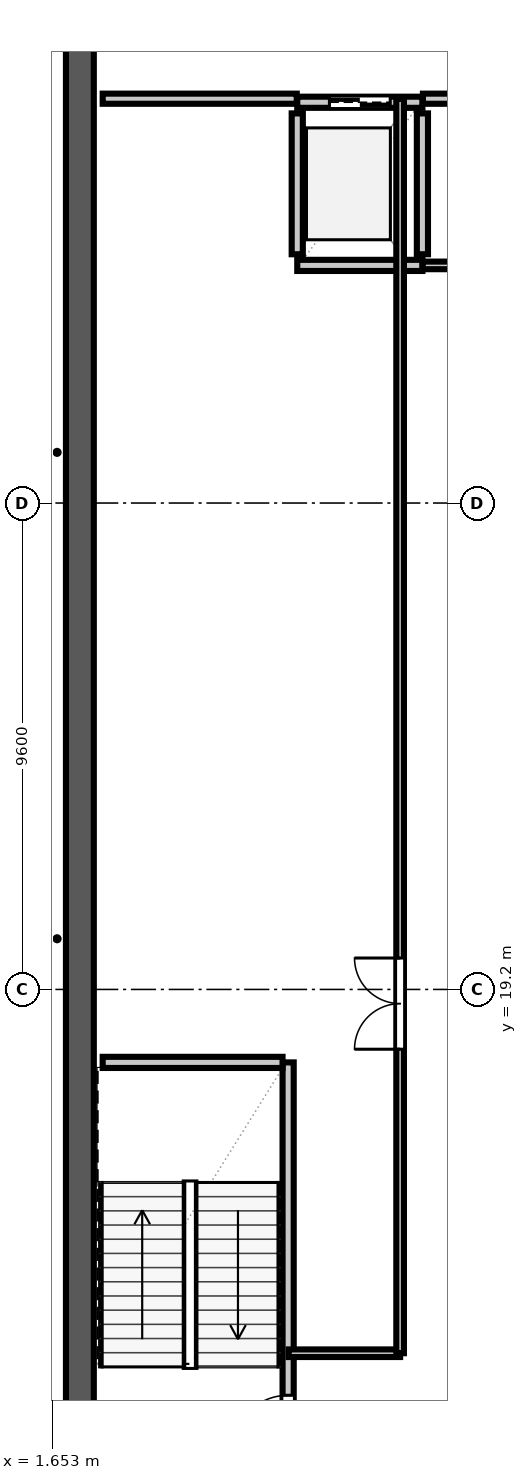
"""IFC4 building model, lengths in metres.
Left out: names, types, materials, properties, quantities, classifications, styles, units other than length and angle.
Written with IfcOpenShell. Run it as: python <this file> out.ifc"""

import sys

from ifc_helpers import new_model, si_unit, direction, frame, frame_2d, origin, place, context, subcontext, project, spatial, rectangle, extrude, element, fill, save


model = new_model("IFC4")
c1 = context("Model", 3, precision=1e-05, world=origin(), true_north=direction((0.0, 1.0)))
c2 = subcontext(c1, "Body", "Model", "MODEL_VIEW")
j1 = project(units=[si_unit("LENGTHUNIT", "METRE"), si_unit("PLANEANGLEUNIT", "RADIAN")], contexts=[c1])
p1 = place(None, origin())
s1 = spatial("IfcSite", under=j1, at=p1, CompositionType="ELEMENT")
p2 = place(p1, origin())
s2 = spatial("IfcBuilding", under=s1, at=p2, CompositionType="ELEMENT")
p3 = place(p2, frame((0.0, 0.0, 256.0)))
s3 = spatial("IfcBuildingStorey", under=s2, at=p3, CompositionType="ELEMENT", Elevation=256.0)
p4 = place(p3, frame((2.2, 9.325, 0.0), z_axis=(0.0, 0.0, 1.0), x_axis=(0.0, 1.0, 0.0)))
e1 = element("IfcWall", 1, at=p4, inside=s3, PredefinedType="SHEAR", context=c2, shape_type="SweptSolid", body=[
    extrude(rectangle(XDim=38.95, YDim=0.55, at=frame_2d((19.475, 0.0))), origin(), (0.0, 0.0, 1.0), 4.74),
])
p5 = place(p3, frame((6.31, 9.95, 0.0), z_axis=(0.0, 0.0, 1.0), x_axis=(0.0, 1.0, 0.0)))
e2 = element("IfcWall", 2, at=p5, inside=s3, PredefinedType="SOLIDWALL", context=c2, shape_type="SweptSolid", body=[
    extrude(rectangle(XDim=7.81, YDim=0.22, at=frame_2d((3.905, 0.0))), origin(), (0.0, 0.0, 1.0), 4.74),
])
p6 = place(p5, frame((0.14, 0.0, 0.0)))
e3 = element("IfcOpeningElement", 3, at=p6, cuts=e2, PredefinedType="OPENING", context=c2, shape_type="SweptSolid", body=[
    extrude(rectangle(XDim=1.1, YDim=2.2, at=frame_2d((0.55, 1.1))), frame((0.0, 0.122, 0.0), z_axis=(0.0, -1.0, 0.0), x_axis=(1.0, 0.0, 0.0)), (0.0, 0.0, 1.0), 0.244),
])
p7 = place(p3, frame((2.65, 17.76, 0.0), z_axis=(0.0, 0.0, 1.0), x_axis=(1.0, 0.0, 0.0)))
e4 = element("IfcWall", 4, at=p7, inside=s3, PredefinedType="SOLIDWALL", context=c2, shape_type="SweptSolid", body=[
    extrude(rectangle(XDim=3.55, YDim=0.22, at=frame_2d((1.775, 0.0))), origin(), (0.0, 0.0, 1.0), 4.74),
])
for number, where, z_axis, x_axis in (
    (5, (6.49, 33.71, 0.0), (0.0, 0.0, 1.0), (0.0, 1.0, 0.0)),
    (6, (8.96, 33.71, 0.0), (0.0, 0.0, 1.0), (0.0, 1.0, 0.0)),
):
    element("IfcWall", number, at=place(p3, frame(where, z_axis=z_axis, x_axis=x_axis)), inside=s3, PredefinedType="SOLIDWALL", context=c2, shape_type="SweptSolid", body=[
        extrude(rectangle(XDim=2.78, YDim=0.22, at=frame_2d((1.39, 0.0))), origin(), (0.0, 0.0, 1.0), 4.74),
    ])
p8 = place(p3, frame((6.49, 33.49, 0.0), z_axis=(0.0, 0.0, 1.0), x_axis=(1.0, 0.0, 0.0)))
e7 = element("IfcWall", 7, at=p8, inside=s3, PredefinedType="SOLIDWALL", context=c2, shape_type="SweptSolid", body=[
    extrude(rectangle(XDim=2.47, YDim=0.22, at=frame_2d((1.235, 0.0))), origin(), (0.0, 0.0, 1.0), 4.74),
])
p9 = place(p3, frame((6.49, 36.71, 0.0), z_axis=(0.0, 0.0, 1.0), x_axis=(1.0, 0.0, 0.0)))
e8 = element("IfcWall", 8, at=p9, inside=s3, PredefinedType="SOLIDWALL", context=c2, shape_type="SweptSolid", body=[
    extrude(rectangle(XDim=2.47, YDim=0.22, at=frame_2d((1.235, 0.0))), origin(), (0.0, 0.0, 1.0), 4.74),
])
p10 = place(p9, frame((0.635, 0.0, 0.0)))
e9 = element("IfcOpeningElement", 9, at=p10, cuts=e8, PredefinedType="OPENING", context=c2, shape_type="SweptSolid", body=[
    extrude(rectangle(XDim=1.2, YDim=2.2, at=frame_2d((0.6, 1.1))), frame((0.0, 0.122, 0.0), z_axis=(0.0, -1.0, 0.0), x_axis=(1.0, 0.0, 0.0)), (0.0, 0.0, 1.0), 0.244),
])
p11 = place(p3, frame((2.65, 36.78, 0.0), z_axis=(0.0, 0.0, 1.0), x_axis=(1.0, 0.0, 0.0)))
e10 = element("IfcWall", 10, at=p11, inside=s3, PredefinedType="SOLIDWALL", context=c2, shape_type="SweptSolid", body=[
    extrude(rectangle(XDim=3.83, YDim=0.2, at=frame_2d((1.915, 0.0))), origin(), (0.0, 0.0, 1.0), 4.74),
])
p12 = place(p3, frame((8.97, 36.78, 0.0), z_axis=(0.0, 0.0, 1.0), x_axis=(1.0, 0.0, 0.0)))
e11 = element("IfcWall", 11, at=p12, inside=s3, PredefinedType="SOLIDWALL", context=c2, shape_type="SweptSolid", body=[
    extrude(rectangle(XDim=1.51, YDim=0.2, at=frame_2d((0.755, 0.0))), origin(), (0.0, 0.0, 1.0), 4.74),
])
p13 = place(p3, frame((8.965, 33.49, 0.0), z_axis=(0.0, 0.0, 1.0), x_axis=(1.0, 0.0, 0.0)))
e12 = element("IfcWall", 12, at=p13, inside=s3, PredefinedType="PARTITIONING", context=c2, shape_type="SweptSolid", body=[
    extrude(rectangle(XDim=1.52, YDim=0.15, at=frame_2d((0.76, 0.0))), origin(), (0.0, 0.0, 1.0), 4.74),
])
p14 = place(p3, frame((6.32, 12.02, 0.0), z_axis=(0.0, 0.0, 1.0), x_axis=(1.0, 0.0, 0.0)))
e13 = element("IfcWall", 13, at=p14, inside=s3, PredefinedType="PARTITIONING", context=c2, shape_type="SweptSolid", body=[
    extrude(rectangle(XDim=2.2, YDim=0.15, at=frame_2d((1.1, 0.0))), origin(), (0.0, 0.0, 1.0), 4.74),
])
p15 = place(p3, frame((8.52, 12.02, 0.0), z_axis=(0.0, 0.0, 1.0), x_axis=(0.0, 1.0, 0.0)))
e14 = element("IfcWall", 14, at=p15, inside=s3, PredefinedType="PARTITIONING", context=c2, shape_type="SweptSolid", body=[
    extrude(rectangle(XDim=24.76, YDim=0.15, at=frame_2d((12.38, 0.0))), origin(), (0.0, 0.0, 1.0), 4.74),
])
p16 = place(p15, frame((6.0, 0.0, 0.0)))
e15 = element("IfcOpeningElement", 15, at=p16, cuts=e14, PredefinedType="OPENING", context=c2, shape_type="SweptSolid", body=[
    extrude(rectangle(XDim=1.8, YDim=2.2, at=frame_2d((0.9, 1.1))), frame((0.0, 0.087, 0.0), z_axis=(0.0, -1.0, 0.0), x_axis=(1.0, 0.0, 0.0)), (0.0, 0.0, 1.0), 0.174),
])
p17 = place(p6, origin())
e16 = element("IfcDoor", 16, at=p17, inside=s3, OperationType="SINGLE_SWING_LEFT", PredefinedType="DOOR", context=c2, shape_type="SweptSolid", body=[
    extrude(rectangle(XDim=1.1, YDim=2.2, at=frame_2d((0.55, 1.1))), frame((0.0, 0.025, 0.0), z_axis=(0.0, -1.0, 0.0), x_axis=(1.0, 0.0, 0.0)), (0.0, 0.0, 1.0), 0.05),
])
fill(e3, e16)
p18 = place(p10, origin())
e17 = element("IfcDoor", 17, at=p18, inside=s3, OperationType="DOUBLE_DOOR_SLIDING", PredefinedType="DOOR", context=c2, shape_type="SweptSolid", body=[
    extrude(rectangle(XDim=1.2, YDim=2.2, at=frame_2d((0.6, 1.1))), frame((0.0, 0.025, 0.0), z_axis=(0.0, -1.0, 0.0), x_axis=(1.0, 0.0, 0.0)), (0.0, 0.0, 1.0), 0.05),
])
fill(e9, e17)
p19 = place(p16, origin())
e18 = element("IfcDoor", 18, at=p19, inside=s3, OperationType="DOUBLE_DOOR_SINGLE_SWING", PredefinedType="DOOR", context=c2, shape_type="SweptSolid", body=[
    extrude(rectangle(XDim=1.8, YDim=2.2, at=frame_2d((0.9, 1.1))), frame((0.0, 0.025, 0.0), z_axis=(0.0, -1.0, 0.0), x_axis=(1.0, 0.0, 0.0)), (0.0, 0.0, 1.0), 0.05),
])
fill(e15, e18)
save(model, sys.argv[1])
